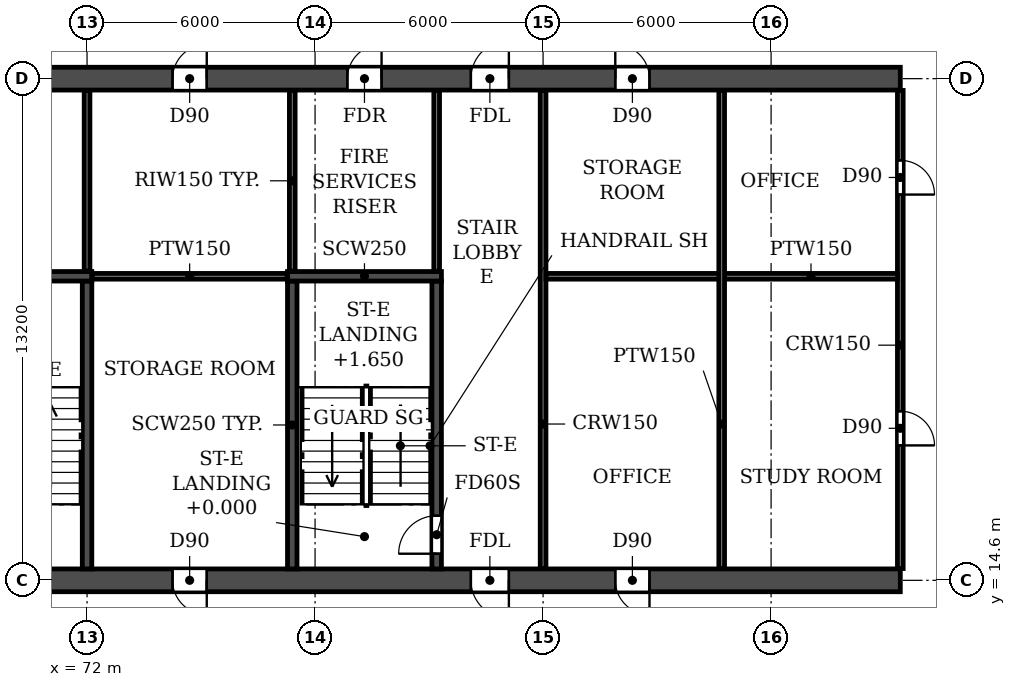
"""IFC4 building model, lengths in metres.
Left out: names, types, materials, properties, quantities, classifications, styles, units other than length and angle.
Written with IfcOpenShell. Run it as: python <this file> out.ifc"""

import sys

from ifc_helpers import new_model, si_unit, direction, frame, frame_2d, origin, place, context, subcontext, project, spatial, rectangle, extrude, element, fill, save


model = new_model("IFC4")
c1 = context("Model", 3, precision=1e-05, world=origin(), true_north=direction((0.0, 1.0)))
c2 = subcontext(c1, "Body", "Model", "MODEL_VIEW")
j1 = project(units=[si_unit("LENGTHUNIT", "METRE"), si_unit("PLANEANGLEUNIT", "RADIAN")], contexts=[c1])
p1 = place(None, origin())
s1 = spatial("IfcSite", under=j1, at=p1, CompositionType="ELEMENT")
p2 = place(p1, origin())
s2 = spatial("IfcBuilding", under=s1, at=p2, CompositionType="ELEMENT")
p3 = place(p2, frame((0.0, 0.0, 53.1)))
s3 = spatial("IfcBuildingStorey", under=s2, at=p3, CompositionType="ELEMENT", Elevation=53.1)
p4 = place(p3, frame((8.6, 14.6, 0.0), z_axis=(0.0, 0.0, 1.0), x_axis=(1.0, 0.0, 0.0)))
e1 = element("IfcWall", 1, at=p4, inside=s3, PredefinedType="SOLIDWALL", context=c2, shape_type="SweptSolid", body=[
    extrude(rectangle(XDim=84.8, YDim=0.6, at=frame_2d((42.4, 0.0))), origin(), (0.0, 0.0, 1.0), 3.05),
])
p5 = place(p4, frame((6.6, 0.0, 0.0)))
e2 = element("IfcOpeningElement", 2, at=p5, cuts=e1, PredefinedType="OPENING", context=c2, shape_type="SweptSolid", body=[
    extrude(rectangle(XDim=0.9, YDim=2.1, at=frame_2d((0.45, 1.05))), frame((0.0, 0.31, 0.0), z_axis=(0.0, -1.0, 0.0), x_axis=(1.0, 0.0, 0.0)), (0.0, 0.0, 1.0), 0.62),
])
p6 = place(p4, frame((10.3, 0.0, 0.0)))
e3 = element("IfcOpeningElement", 3, at=p6, cuts=e1, PredefinedType="OPENING", context=c2, shape_type="SweptSolid", body=[
    extrude(rectangle(XDim=1.0, YDim=2.1, at=frame_2d((0.5, 1.05))), frame((0.0, 0.31, 0.0), z_axis=(0.0, -1.0, 0.0), x_axis=(1.0, 0.0, 0.0)), (0.0, 0.0, 1.0), 0.62),
])
p7 = place(p4, frame((18.25, 0.0, 0.0)))
e4 = element("IfcOpeningElement", 4, at=p7, cuts=e1, PredefinedType="OPENING", context=c2, shape_type="SweptSolid", body=[
    extrude(rectangle(XDim=0.9, YDim=2.1, at=frame_2d((0.45, 1.05))), frame((0.0, 0.31, 0.0), z_axis=(0.0, -1.0, 0.0), x_axis=(1.0, 0.0, 0.0)), (0.0, 0.0, 1.0), 0.62),
])
p8 = place(p4, frame((22.8, 0.0, 0.0)))
e5 = element("IfcOpeningElement", 5, at=p8, cuts=e1, PredefinedType="OPENING", context=c2, shape_type="SweptSolid", body=[
    extrude(rectangle(XDim=1.0, YDim=2.1, at=frame_2d((0.5, 1.05))), frame((0.0, 0.31, 0.0), z_axis=(0.0, -1.0, 0.0), x_axis=(1.0, 0.0, 0.0)), (0.0, 0.0, 1.0), 0.62),
])
p9 = place(p4, frame((34.1, 0.0, 0.0)))
e6 = element("IfcOpeningElement", 6, at=p9, cuts=e1, PredefinedType="OPENING", context=c2, shape_type="SweptSolid", body=[
    extrude(rectangle(XDim=1.0, YDim=2.1, at=frame_2d((0.5, 1.05))), frame((0.0, 0.31, 0.0), z_axis=(0.0, -1.0, 0.0), x_axis=(1.0, 0.0, 0.0)), (0.0, 0.0, 1.0), 0.62),
])
p10 = place(p4, frame((38.0, 0.0, 0.0)))
e7 = element("IfcOpeningElement", 7, at=p10, cuts=e1, PredefinedType="OPENING", context=c2, shape_type="SweptSolid", body=[
    extrude(rectangle(XDim=1.0, YDim=2.1, at=frame_2d((0.5, 1.05))), frame((0.0, 0.31, 0.0), z_axis=(0.0, -1.0, 0.0), x_axis=(1.0, 0.0, 0.0)), (0.0, 0.0, 1.0), 0.62),
])
p11 = place(p4, frame((41.9, 0.0, 0.0)))
e8 = element("IfcOpeningElement", 8, at=p11, cuts=e1, PredefinedType="OPENING", context=c2, shape_type="SweptSolid", body=[
    extrude(rectangle(XDim=1.0, YDim=2.1, at=frame_2d((0.5, 1.05))), frame((0.0, 0.31, 0.0), z_axis=(0.0, -1.0, 0.0), x_axis=(1.0, 0.0, 0.0)), (0.0, 0.0, 1.0), 0.62),
])
p12 = place(p4, frame((45.8, 0.0, 0.0)))
e9 = element("IfcOpeningElement", 9, at=p12, cuts=e1, PredefinedType="OPENING", context=c2, shape_type="SweptSolid", body=[
    extrude(rectangle(XDim=1.0, YDim=2.1, at=frame_2d((0.5, 1.05))), frame((0.0, 0.31, 0.0), z_axis=(0.0, -1.0, 0.0), x_axis=(1.0, 0.0, 0.0)), (0.0, 0.0, 1.0), 0.62),
])
p13 = place(p4, frame((49.7, 0.0, 0.0)))
e10 = element("IfcOpeningElement", 10, at=p13, cuts=e1, PredefinedType="OPENING", context=c2, shape_type="SweptSolid", body=[
    extrude(rectangle(XDim=1.0, YDim=2.1, at=frame_2d((0.5, 1.05))), frame((0.0, 0.31, 0.0), z_axis=(0.0, -1.0, 0.0), x_axis=(1.0, 0.0, 0.0)), (0.0, 0.0, 1.0), 0.62),
])
p14 = place(p4, frame((61.0, 0.0, 0.0)))
e11 = element("IfcOpeningElement", 11, at=p14, cuts=e1, PredefinedType="OPENING", context=c2, shape_type="SweptSolid", body=[
    extrude(rectangle(XDim=1.0, YDim=2.1, at=frame_2d((0.5, 1.05))), frame((0.0, 0.31, 0.0), z_axis=(0.0, -1.0, 0.0), x_axis=(1.0, 0.0, 0.0)), (0.0, 0.0, 1.0), 0.62),
])
p15 = place(p4, frame((65.65, 0.0, 0.0)))
e12 = element("IfcOpeningElement", 12, at=p15, cuts=e1, PredefinedType="OPENING", context=c2, shape_type="SweptSolid", body=[
    extrude(rectangle(XDim=0.9, YDim=2.1, at=frame_2d((0.45, 1.05))), frame((0.0, 0.31, 0.0), z_axis=(0.0, -1.0, 0.0), x_axis=(1.0, 0.0, 0.0)), (0.0, 0.0, 1.0), 0.62),
])
p16 = place(p4, frame((73.5, 0.0, 0.0)))
e13 = element("IfcOpeningElement", 13, at=p16, cuts=e1, PredefinedType="OPENING", context=c2, shape_type="SweptSolid", body=[
    extrude(rectangle(XDim=1.0, YDim=2.1, at=frame_2d((0.5, 1.05))), frame((0.0, 0.31, 0.0), z_axis=(0.0, -1.0, 0.0), x_axis=(1.0, 0.0, 0.0)), (0.0, 0.0, 1.0), 0.62),
])
p17 = place(p4, frame((77.3, 0.0, 0.0)))
e14 = element("IfcOpeningElement", 14, at=p17, cuts=e1, PredefinedType="OPENING", context=c2, shape_type="SweptSolid", body=[
    extrude(rectangle(XDim=0.9, YDim=2.1, at=frame_2d((0.45, 1.05))), frame((0.0, 0.31, 0.0), z_axis=(0.0, -1.0, 0.0), x_axis=(1.0, 0.0, 0.0)), (0.0, 0.0, 1.0), 0.62),
])
p18 = place(p3, frame((8.6, 27.8, 0.0), z_axis=(0.0, 0.0, 1.0), x_axis=(1.0, 0.0, 0.0)))
e15 = element("IfcWall", 15, at=p18, inside=s3, PredefinedType="SOLIDWALL", context=c2, shape_type="SweptSolid", body=[
    extrude(rectangle(XDim=84.8, YDim=0.6, at=frame_2d((42.4, 0.0))), origin(), (0.0, 0.0, 1.0), 3.05),
])
p19 = place(p18, frame((6.6, 0.0, 0.0)))
e16 = element("IfcOpeningElement", 16, at=p19, cuts=e15, PredefinedType="OPENING", context=c2, shape_type="SweptSolid", body=[
    extrude(rectangle(XDim=0.9, YDim=2.1, at=frame_2d((0.45, 1.05))), frame((0.0, 0.31, 0.0), z_axis=(0.0, -1.0, 0.0), x_axis=(1.0, 0.0, 0.0)), (0.0, 0.0, 1.0), 0.62),
])
p20 = place(p18, frame((10.3, 0.0, 0.0)))
e17 = element("IfcOpeningElement", 17, at=p20, cuts=e15, PredefinedType="OPENING", context=c2, shape_type="SweptSolid", body=[
    extrude(rectangle(XDim=1.0, YDim=2.1, at=frame_2d((0.5, 1.05))), frame((0.0, 0.31, 0.0), z_axis=(0.0, -1.0, 0.0), x_axis=(1.0, 0.0, 0.0)), (0.0, 0.0, 1.0), 0.62),
])
p21 = place(p18, frame((13.65, 0.0, 0.0)))
e18 = element("IfcOpeningElement", 18, at=p21, cuts=e15, PredefinedType="OPENING", context=c2, shape_type="SweptSolid", body=[
    extrude(rectangle(XDim=0.9, YDim=2.1, at=frame_2d((0.45, 1.05))), frame((0.0, 0.31, 0.0), z_axis=(0.0, -1.0, 0.0), x_axis=(1.0, 0.0, 0.0)), (0.0, 0.0, 1.0), 0.62),
])
p22 = place(p18, frame((18.25, 0.0, 0.0)))
e19 = element("IfcOpeningElement", 19, at=p22, cuts=e15, PredefinedType="OPENING", context=c2, shape_type="SweptSolid", body=[
    extrude(rectangle(XDim=0.9, YDim=2.1, at=frame_2d((0.45, 1.05))), frame((0.0, 0.31, 0.0), z_axis=(0.0, -1.0, 0.0), x_axis=(1.0, 0.0, 0.0)), (0.0, 0.0, 1.0), 0.62),
])
p23 = place(p18, frame((22.85, 0.0, 0.0)))
e20 = element("IfcOpeningElement", 20, at=p23, cuts=e15, PredefinedType="OPENING", context=c2, shape_type="SweptSolid", body=[
    extrude(rectangle(XDim=0.9, YDim=2.1, at=frame_2d((0.45, 1.05))), frame((0.0, 0.31, 0.0), z_axis=(0.0, -1.0, 0.0), x_axis=(1.0, 0.0, 0.0)), (0.0, 0.0, 1.0), 0.62),
])
p24 = place(p18, frame((26.0, 0.0, 0.0)))
e21 = element("IfcOpeningElement", 21, at=p24, cuts=e15, PredefinedType="OPENING", context=c2, shape_type="SweptSolid", body=[
    extrude(rectangle(XDim=1.0, YDim=2.1, at=frame_2d((0.5, 1.05))), frame((0.0, 0.31, 0.0), z_axis=(0.0, -1.0, 0.0), x_axis=(1.0, 0.0, 0.0)), (0.0, 0.0, 1.0), 0.62),
])
p25 = place(p18, frame((31.2, 0.0, 0.0)))
e22 = element("IfcOpeningElement", 22, at=p25, cuts=e15, PredefinedType="OPENING", context=c2, shape_type="SweptSolid", body=[
    extrude(rectangle(XDim=1.0, YDim=2.1, at=frame_2d((0.5, 1.05))), frame((0.0, 0.31, 0.0), z_axis=(0.0, -1.0, 0.0), x_axis=(1.0, 0.0, 0.0)), (0.0, 0.0, 1.0), 0.62),
])
p26 = place(p18, frame((39.0, 0.0, 0.0)))
e23 = element("IfcOpeningElement", 23, at=p26, cuts=e15, PredefinedType="OPENING", context=c2, shape_type="SweptSolid", body=[
    extrude(rectangle(XDim=1.0, YDim=2.1, at=frame_2d((0.5, 1.05))), frame((0.0, 0.31, 0.0), z_axis=(0.0, -1.0, 0.0), x_axis=(1.0, 0.0, 0.0)), (0.0, 0.0, 1.0), 0.62),
])
p27 = place(p18, frame((41.9, 0.0, 0.0)))
e24 = element("IfcOpeningElement", 24, at=p27, cuts=e15, PredefinedType="OPENING", context=c2, shape_type="SweptSolid", body=[
    extrude(rectangle(XDim=1.0, YDim=2.1, at=frame_2d((0.5, 1.05))), frame((0.0, 0.31, 0.0), z_axis=(0.0, -1.0, 0.0), x_axis=(1.0, 0.0, 0.0)), (0.0, 0.0, 1.0), 0.62),
])
p28 = place(p18, frame((44.8, 0.0, 0.0)))
e25 = element("IfcOpeningElement", 25, at=p28, cuts=e15, PredefinedType="OPENING", context=c2, shape_type="SweptSolid", body=[
    extrude(rectangle(XDim=1.0, YDim=2.1, at=frame_2d((0.5, 1.05))), frame((0.0, 0.31, 0.0), z_axis=(0.0, -1.0, 0.0), x_axis=(1.0, 0.0, 0.0)), (0.0, 0.0, 1.0), 0.62),
])
p29 = place(p18, frame((48.7, 0.0, 0.0)))
e26 = element("IfcOpeningElement", 26, at=p29, cuts=e15, PredefinedType="OPENING", context=c2, shape_type="SweptSolid", body=[
    extrude(rectangle(XDim=1.0, YDim=2.1, at=frame_2d((0.5, 1.05))), frame((0.0, 0.31, 0.0), z_axis=(0.0, -1.0, 0.0), x_axis=(1.0, 0.0, 0.0)), (0.0, 0.0, 1.0), 0.62),
])
p30 = place(p18, frame((53.65, 0.0, 0.0)))
e27 = element("IfcOpeningElement", 27, at=p30, cuts=e15, PredefinedType="OPENING", context=c2, shape_type="SweptSolid", body=[
    extrude(rectangle(XDim=1.5, YDim=2.1, at=frame_2d((0.75, 1.05))), frame((0.0, 0.31, 0.0), z_axis=(0.0, -1.0, 0.0), x_axis=(1.0, 0.0, 0.0)), (0.0, 0.0, 1.0), 0.62),
])
p31 = place(p18, frame((57.8, 0.0, 0.0)))
e28 = element("IfcOpeningElement", 28, at=p31, cuts=e15, PredefinedType="OPENING", context=c2, shape_type="SweptSolid", body=[
    extrude(rectangle(XDim=1.0, YDim=2.1, at=frame_2d((0.5, 1.05))), frame((0.0, 0.31, 0.0), z_axis=(0.0, -1.0, 0.0), x_axis=(1.0, 0.0, 0.0)), (0.0, 0.0, 1.0), 0.62),
])
p32 = place(p18, frame((61.05, 0.0, 0.0)))
e29 = element("IfcOpeningElement", 29, at=p32, cuts=e15, PredefinedType="OPENING", context=c2, shape_type="SweptSolid", body=[
    extrude(rectangle(XDim=0.9, YDim=2.1, at=frame_2d((0.45, 1.05))), frame((0.0, 0.31, 0.0), z_axis=(0.0, -1.0, 0.0), x_axis=(1.0, 0.0, 0.0)), (0.0, 0.0, 1.0), 0.62),
])
p33 = place(p18, frame((65.65, 0.0, 0.0)))
e30 = element("IfcOpeningElement", 30, at=p33, cuts=e15, PredefinedType="OPENING", context=c2, shape_type="SweptSolid", body=[
    extrude(rectangle(XDim=0.9, YDim=2.1, at=frame_2d((0.45, 1.05))), frame((0.0, 0.31, 0.0), z_axis=(0.0, -1.0, 0.0), x_axis=(1.0, 0.0, 0.0)), (0.0, 0.0, 1.0), 0.62),
])
p34 = place(p18, frame((70.25, 0.0, 0.0)))
e31 = element("IfcOpeningElement", 31, at=p34, cuts=e15, PredefinedType="OPENING", context=c2, shape_type="SweptSolid", body=[
    extrude(rectangle(XDim=0.9, YDim=2.1, at=frame_2d((0.45, 1.05))), frame((0.0, 0.31, 0.0), z_axis=(0.0, -1.0, 0.0), x_axis=(1.0, 0.0, 0.0)), (0.0, 0.0, 1.0), 0.62),
])
p35 = place(p18, frame((73.5, 0.0, 0.0)))
e32 = element("IfcOpeningElement", 32, at=p35, cuts=e15, PredefinedType="OPENING", context=c2, shape_type="SweptSolid", body=[
    extrude(rectangle(XDim=1.0, YDim=2.1, at=frame_2d((0.5, 1.05))), frame((0.0, 0.31, 0.0), z_axis=(0.0, -1.0, 0.0), x_axis=(1.0, 0.0, 0.0)), (0.0, 0.0, 1.0), 0.62),
])
p36 = place(p18, frame((77.3, 0.0, 0.0)))
e33 = element("IfcOpeningElement", 33, at=p36, cuts=e15, PredefinedType="OPENING", context=c2, shape_type="SweptSolid", body=[
    extrude(rectangle(XDim=0.9, YDim=2.1, at=frame_2d((0.45, 1.05))), frame((0.0, 0.31, 0.0), z_axis=(0.0, -1.0, 0.0), x_axis=(1.0, 0.0, 0.0)), (0.0, 0.0, 1.0), 0.62),
])
p37 = place(p3, frame((72.0, 14.9, 0.0), z_axis=(0.0, 0.0, 1.0), x_axis=(0.0, 1.0, 0.0)))
e34 = element("IfcWall", 34, at=p37, inside=s3, PredefinedType="SOLIDWALL", context=c2, shape_type="SweptSolid", body=[
    extrude(rectangle(XDim=7.575, YDim=0.25, at=frame_2d((3.788, 0.0))), origin(), (0.0, 0.0, 1.0), 3.05),
])
p38 = place(p3, frame((68.075, 22.6, 0.0), z_axis=(0.0, 0.0, 1.0), x_axis=(1.0, 0.0, 0.0)))
e35 = element("IfcWall", 35, at=p38, inside=s3, PredefinedType="SOLIDWALL", context=c2, shape_type="SweptSolid", body=[
    extrude(rectangle(XDim=4.05, YDim=0.25, at=frame_2d((2.025, 0.0))), origin(), (0.0, 0.0, 1.0), 3.05),
])
p39 = place(p3, frame((77.4, 14.9, 0.0), z_axis=(0.0, 0.0, 1.0), x_axis=(0.0, 1.0, 0.0)))
e36 = element("IfcWall", 36, at=p39, inside=s3, PredefinedType="SOLIDWALL", context=c2, shape_type="SweptSolid", body=[
    extrude(rectangle(XDim=7.575, YDim=0.25, at=frame_2d((3.788, 0.0))), origin(), (0.0, 0.0, 1.0), 3.05),
])
p40 = place(p3, frame((81.2, 14.9, 0.0), z_axis=(0.0, 0.0, 1.0), x_axis=(0.0, 1.0, 0.0)))
e37 = element("IfcWall", 37, at=p40, inside=s3, PredefinedType="SOLIDWALL", context=c2, shape_type="SweptSolid", body=[
    extrude(rectangle(XDim=7.575, YDim=0.25, at=frame_2d((3.788, 0.0))), origin(), (0.0, 0.0, 1.0), 3.05),
])
p41 = place(p40, frame((0.4, 0.0, 0.0)))
e38 = element("IfcOpeningElement", 38, at=p41, cuts=e37, PredefinedType="OPENING", context=c2, shape_type="SweptSolid", body=[
    extrude(rectangle(XDim=1.0, YDim=2.1, at=frame_2d((0.5, 1.05))), frame((0.0, 0.135, 0.0), z_axis=(0.0, -1.0, 0.0), x_axis=(1.0, 0.0, 0.0)), (0.0, 0.0, 1.0), 0.27),
])
p42 = place(p3, frame((77.275, 22.6, 0.0), z_axis=(0.0, 0.0, 1.0), x_axis=(1.0, 0.0, 0.0)))
e39 = element("IfcWall", 39, at=p42, inside=s3, PredefinedType="SOLIDWALL", context=c2, shape_type="SweptSolid", body=[
    extrude(rectangle(XDim=4.05, YDim=0.25, at=frame_2d((2.025, 0.0))), origin(), (0.0, 0.0, 1.0), 3.05),
])
p43 = place(p3, frame((84.0, 14.91, 0.0), z_axis=(0.0, 0.0, 1.0), x_axis=(0.0, 1.0, 0.0)))
e40 = element("IfcWall", 40, at=p43, inside=s3, PredefinedType="PARTITIONING", context=c2, shape_type="SweptSolid", body=[
    extrude(rectangle(XDim=12.58, YDim=0.15, at=frame_2d((6.29, 0.0))), origin(), (0.0, 0.0, 1.0), 3.05),
])
p44 = place(p3, frame((93.4, 14.91, 0.0), z_axis=(0.0, 0.0, 1.0), x_axis=(0.0, 1.0, 0.0)))
e41 = element("IfcWall", 41, at=p44, inside=s3, PredefinedType="PARTITIONING", context=c2, shape_type="SweptSolid", body=[
    extrude(rectangle(XDim=12.58, YDim=0.15, at=frame_2d((6.29, 0.0))), origin(), (0.0, 0.0, 1.0), 3.05),
])
p45 = place(p44, frame((3.24, 0.0, 0.0)))
e42 = element("IfcOpeningElement", 42, at=p45, cuts=e41, PredefinedType="OPENING", context=c2, shape_type="SweptSolid", body=[
    extrude(rectangle(XDim=0.9, YDim=2.1, at=frame_2d((0.45, 1.05))), frame((0.0, 0.085, 0.0), z_axis=(0.0, -1.0, 0.0), x_axis=(1.0, 0.0, 0.0)), (0.0, 0.0, 1.0), 0.17),
])
p46 = place(p44, frame((9.84, 0.0, 0.0)))
e43 = element("IfcOpeningElement", 43, at=p46, cuts=e41, PredefinedType="OPENING", context=c2, shape_type="SweptSolid", body=[
    extrude(rectangle(XDim=0.9, YDim=2.1, at=frame_2d((0.45, 1.05))), frame((0.0, 0.085, 0.0), z_axis=(0.0, -1.0, 0.0), x_axis=(1.0, 0.0, 0.0)), (0.0, 0.0, 1.0), 0.17),
])
p47 = place(p3, frame((72.135, 22.6, 0.0), z_axis=(0.0, 0.0, 1.0), x_axis=(1.0, 0.0, 0.0)))
e44 = element("IfcWall", 44, at=p47, inside=s3, PredefinedType="PARTITIONING", context=c2, shape_type="SweptSolid", body=[
    extrude(rectangle(XDim=5.13, YDim=0.15, at=frame_2d((2.565, 0.0))), origin(), (0.0, 0.0, 1.0), 3.05),
])
p48 = place(p3, frame((84.075, 22.6, 0.0), z_axis=(0.0, 0.0, 1.0), x_axis=(1.0, 0.0, 0.0)))
e45 = element("IfcWall", 45, at=p48, inside=s3, PredefinedType="PARTITIONING", context=c2, shape_type="SweptSolid", body=[
    extrude(rectangle(XDim=9.25, YDim=0.15, at=frame_2d((4.625, 0.0))), origin(), (0.0, 0.0, 1.0), 3.05),
])
p49 = place(p3, frame((88.7, 14.91, 0.0), z_axis=(0.0, 0.0, 1.0), x_axis=(0.0, 1.0, 0.0)))
e46 = element("IfcWall", 46, at=p49, inside=s3, PredefinedType="PARTITIONING", context=c2, shape_type="SweptSolid", body=[
    extrude(rectangle(XDim=12.58, YDim=0.15, at=frame_2d((6.29, 0.0))), origin(), (0.0, 0.0, 1.0), 3.05),
])
for number, where, z_axis, x_axis in (
    (47, (72.0, 22.735, 0.0), (0.0, 0.0, 1.0), (0.0, 1.0, 0.0)),
    (48, (77.4, 22.735, 0.0), (0.0, 0.0, 1.0), (0.0, 1.0, 0.0)),
    (49, (81.2, 22.735, 0.0), (0.0, 0.0, 1.0), (0.0, 1.0, 0.0)),
):
    element("IfcWall", number, at=place(p3, frame(where, z_axis=z_axis, x_axis=x_axis)), inside=s3, PredefinedType="PARTITIONING", context=c2, shape_type="SweptSolid", body=[
        extrude(rectangle(XDim=4.755, YDim=0.15, at=frame_2d((2.377, 0.0))), origin(), (0.0, 0.0, 1.0), 3.05),
    ])
p50 = place(p45, frame((0.9, 0.0, 0.0), z_axis=(0.0, 0.0, 1.0), x_axis=(-1.0, 0.0, 0.0)))
e50 = element("IfcDoor", 50, at=p50, inside=s3, OperationType="SINGLE_SWING_RIGHT", PredefinedType="DOOR", context=c2, shape_type="SweptSolid", body=[
    extrude(rectangle(XDim=0.9, YDim=2.1, at=frame_2d((0.45, 1.05))), frame((0.0, 0.025, 0.0), z_axis=(0.0, -1.0, 0.0), x_axis=(1.0, 0.0, 0.0)), (0.0, 0.0, 1.0), 0.05),
])
fill(e42, e50)
p51 = place(p46, frame((0.9, 0.0, 0.0), z_axis=(0.0, 0.0, 1.0), x_axis=(-1.0, 0.0, 0.0)))
e51 = element("IfcDoor", 51, at=p51, inside=s3, OperationType="SINGLE_SWING_RIGHT", PredefinedType="DOOR", context=c2, shape_type="SweptSolid", body=[
    extrude(rectangle(XDim=0.9, YDim=2.1, at=frame_2d((0.45, 1.05))), frame((0.0, 0.025, 0.0), z_axis=(0.0, -1.0, 0.0), x_axis=(1.0, 0.0, 0.0)), (0.0, 0.0, 1.0), 0.05),
])
fill(e43, e51)
p52 = place(p33, origin())
e52 = element("IfcDoor", 52, at=p52, inside=s3, OperationType="SINGLE_SWING_RIGHT", PredefinedType="DOOR", context=c2, shape_type="SweptSolid", body=[
    extrude(rectangle(XDim=0.9, YDim=2.1, at=frame_2d((0.45, 1.05))), frame((0.0, 0.025, 0.0), z_axis=(0.0, -1.0, 0.0), x_axis=(1.0, 0.0, 0.0)), (0.0, 0.0, 1.0), 0.05),
])
fill(e30, e52)
p53 = place(p34, origin())
e53 = element("IfcDoor", 53, at=p53, inside=s3, OperationType="SINGLE_SWING_RIGHT", PredefinedType="DOOR", context=c2, shape_type="SweptSolid", body=[
    extrude(rectangle(XDim=0.9, YDim=2.1, at=frame_2d((0.45, 1.05))), frame((0.0, 0.025, 0.0), z_axis=(0.0, -1.0, 0.0), x_axis=(1.0, 0.0, 0.0)), (0.0, 0.0, 1.0), 0.05),
])
fill(e31, e53)
p54 = place(p35, origin())
e54 = element("IfcDoor", 54, at=p54, inside=s3, OperationType="SINGLE_SWING_RIGHT", PredefinedType="DOOR", context=c2, shape_type="SweptSolid", body=[
    extrude(rectangle(XDim=1.0, YDim=2.1, at=frame_2d((0.5, 1.05))), frame((0.0, 0.025, 0.0), z_axis=(0.0, -1.0, 0.0), x_axis=(1.0, 0.0, 0.0)), (0.0, 0.0, 1.0), 0.05),
])
fill(e32, e54)
p55 = place(p36, origin())
e55 = element("IfcDoor", 55, at=p55, inside=s3, OperationType="SINGLE_SWING_LEFT", PredefinedType="DOOR", context=c2, shape_type="SweptSolid", body=[
    extrude(rectangle(XDim=0.9, YDim=2.1, at=frame_2d((0.45, 1.05))), frame((0.0, 0.025, 0.0), z_axis=(0.0, -1.0, 0.0), x_axis=(1.0, 0.0, 0.0)), (0.0, 0.0, 1.0), 0.05),
])
fill(e33, e55)
p56 = place(p15, frame((0.9, 0.0, 0.0), z_axis=(0.0, 0.0, 1.0), x_axis=(-1.0, 0.0, 0.0)))
e56 = element("IfcDoor", 56, at=p56, inside=s3, OperationType="SINGLE_SWING_LEFT", PredefinedType="DOOR", context=c2, shape_type="SweptSolid", body=[
    extrude(rectangle(XDim=0.9, YDim=2.1, at=frame_2d((0.45, 1.05))), frame((0.0, 0.025, 0.0), z_axis=(0.0, -1.0, 0.0), x_axis=(1.0, 0.0, 0.0)), (0.0, 0.0, 1.0), 0.05),
])
fill(e12, e56)
p57 = place(p16, frame((1.0, 0.0, 0.0), z_axis=(0.0, 0.0, 1.0), x_axis=(-1.0, 0.0, 0.0)))
e57 = element("IfcDoor", 57, at=p57, inside=s3, OperationType="SINGLE_SWING_LEFT", PredefinedType="DOOR", context=c2, shape_type="SweptSolid", body=[
    extrude(rectangle(XDim=1.0, YDim=2.1, at=frame_2d((0.5, 1.05))), frame((0.0, 0.025, 0.0), z_axis=(0.0, -1.0, 0.0), x_axis=(1.0, 0.0, 0.0)), (0.0, 0.0, 1.0), 0.05),
])
fill(e13, e57)
p58 = place(p17, frame((0.9, 0.0, 0.0), z_axis=(0.0, 0.0, 1.0), x_axis=(-1.0, 0.0, 0.0)))
e58 = element("IfcDoor", 58, at=p58, inside=s3, OperationType="SINGLE_SWING_LEFT", PredefinedType="DOOR", context=c2, shape_type="SweptSolid", body=[
    extrude(rectangle(XDim=0.9, YDim=2.1, at=frame_2d((0.45, 1.05))), frame((0.0, 0.025, 0.0), z_axis=(0.0, -1.0, 0.0), x_axis=(1.0, 0.0, 0.0)), (0.0, 0.0, 1.0), 0.05),
])
fill(e14, e58)
p59 = place(p41, origin())
e59 = element("IfcDoor", 59, at=p59, inside=s3, OperationType="SINGLE_SWING_LEFT", PredefinedType="DOOR", context=c2, shape_type="SweptSolid", body=[
    extrude(rectangle(XDim=1.0, YDim=2.1, at=frame_2d((0.5, 1.05))), frame((0.0, 0.025, 0.0), z_axis=(0.0, -1.0, 0.0), x_axis=(1.0, 0.0, 0.0)), (0.0, 0.0, 1.0), 0.05),
])
fill(e38, e59)
save(model, sys.argv[1])
